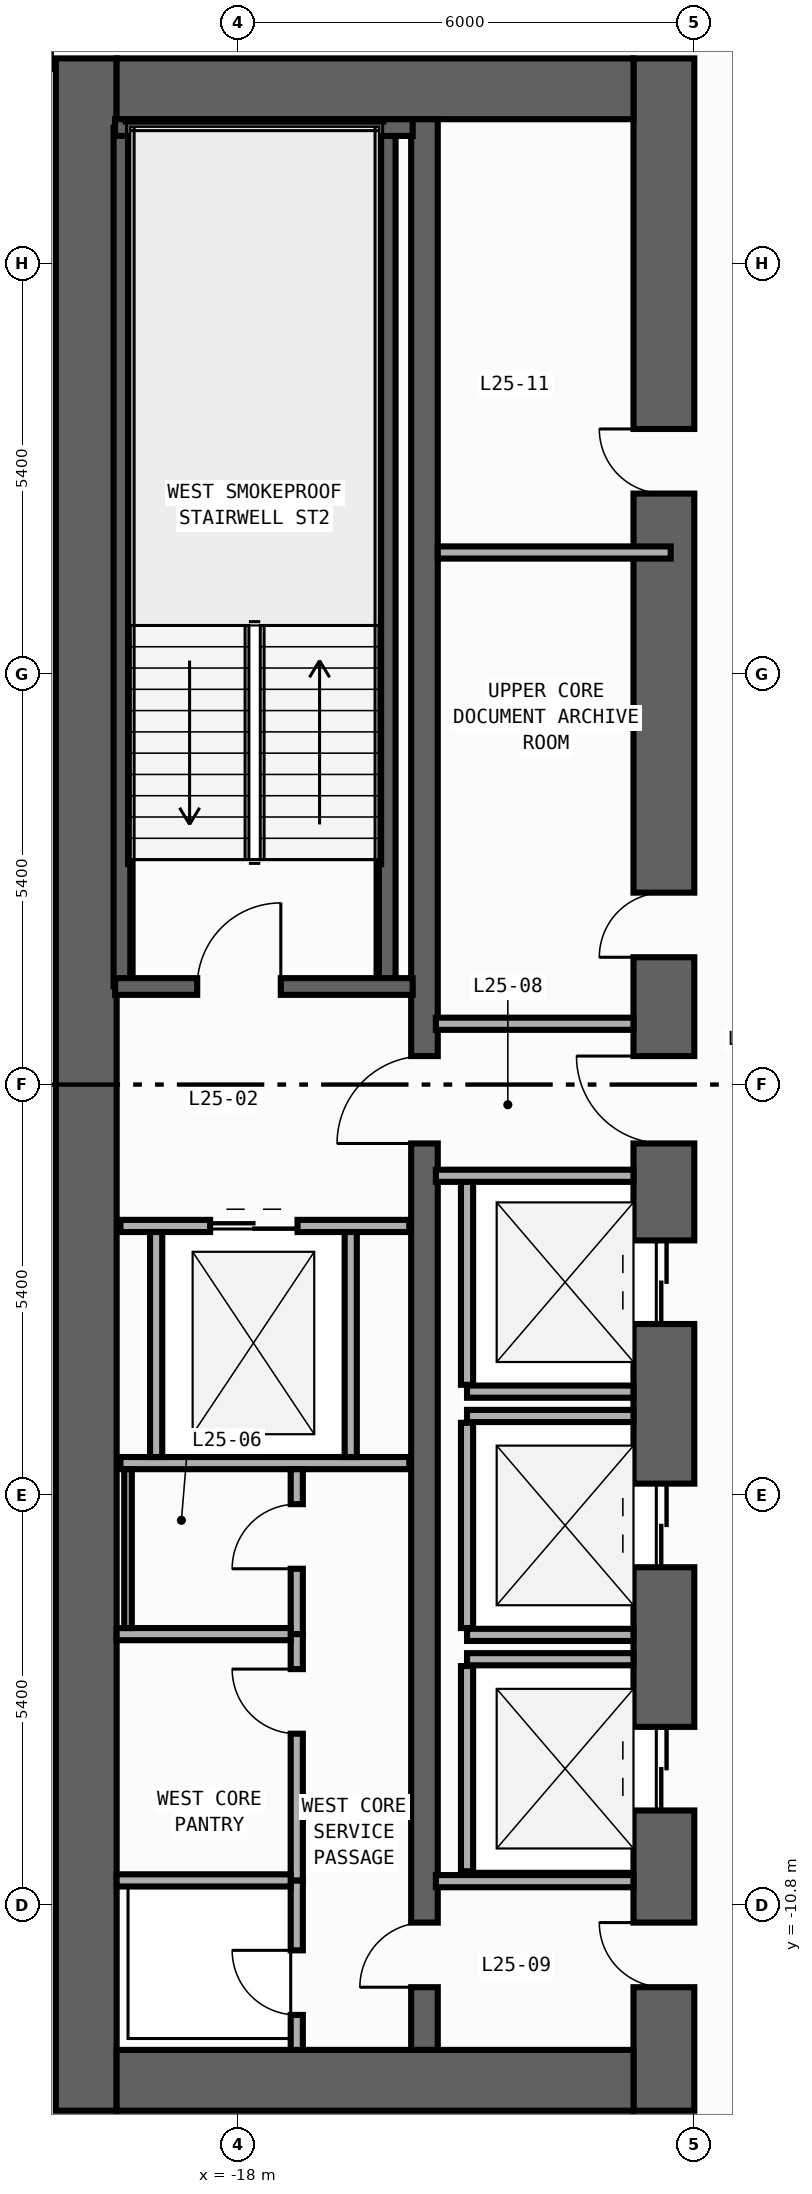
"""IFC4 building model, lengths in metres.
Left out: names, types, materials, properties, quantities, classifications, styles, units other than length and angle.
Written with IfcOpenShell. Run it as: python <this file> out.ifc"""

import sys

from ifc_helpers import new_model, si_unit, direction, frame, frame_2d, origin, place, context, subcontext, project, spatial, rectangle, extrude, element, fill, save


model = new_model("IFC4")
c1 = context("Model", 3, precision=1e-05, world=origin(), true_north=direction((0.0, 1.0)))
c2 = subcontext(c1, "Body", "Model", "MODEL_VIEW")
j1 = project(units=[si_unit("LENGTHUNIT", "METRE"), si_unit("PLANEANGLEUNIT", "RADIAN")], contexts=[c1])
p1 = place(None, origin())
s1 = spatial("IfcSite", under=j1, at=p1, CompositionType="ELEMENT")
p2 = place(p1, origin())
s2 = spatial("IfcBuilding", under=s1, at=p2, CompositionType="ELEMENT")
p3 = place(p2, frame((0.0, 0.0, 110.0)))
s3 = spatial("IfcBuildingStorey", under=s2, at=p3, CompositionType="ELEMENT", Elevation=110.0)
p4 = place(p3, frame((-20.0, -13.5, 0.0), z_axis=(0.0, 0.0, 1.0), x_axis=(0.0, 1.0, 0.0)))
e1 = element("IfcWall", 1, at=p4, inside=s3, PredefinedType="SHEAR", context=c2, shape_type="SweptSolid", body=[
    extrude(rectangle(XDim=27.0, YDim=0.8, at=frame_2d((13.5, 0.0))), origin(), (0.0, 0.0, 1.0), 3.94),
])
p5 = place(p3, frame((-12.4, -13.5, 0.0), z_axis=(0.0, 0.0, 1.0), x_axis=(0.0, 1.0, 0.0)))
e2 = element("IfcWall", 2, at=p5, inside=s3, PredefinedType="SHEAR", context=c2, shape_type="SweptSolid", body=[
    extrude(rectangle(XDim=27.0, YDim=0.8, at=frame_2d((13.5, 0.0))), origin(), (0.0, 0.0, 1.0), 3.94),
])
p6 = place(p5, frame((10.35, 0.0, 0.0)))
e3 = element("IfcOpeningElement", 3, at=p6, cuts=e2, PredefinedType="OPENING", context=c2, shape_type="SweptSolid", body=[
    extrude(rectangle(XDim=1.1, YDim=2.2, at=frame_2d((0.55, 1.1))), frame((0.0, 0.41, 0.0), z_axis=(0.0, -1.0, 0.0), x_axis=(1.0, 0.0, 0.0)), (0.0, 0.0, 1.0), 0.82),
])
p7 = place(p5, frame((7.15, 0.0, 0.0)))
e4 = element("IfcOpeningElement", 4, at=p7, cuts=e2, PredefinedType="OPENING", context=c2, shape_type="SweptSolid", body=[
    extrude(rectangle(XDim=1.1, YDim=2.2, at=frame_2d((0.55, 1.1))), frame((0.0, 0.41, 0.0), z_axis=(0.0, -1.0, 0.0), x_axis=(1.0, 0.0, 0.0)), (0.0, 0.0, 1.0), 0.82),
])
p8 = place(p5, frame((3.95, 0.0, 0.0)))
e5 = element("IfcOpeningElement", 5, at=p8, cuts=e2, PredefinedType="OPENING", context=c2, shape_type="SweptSolid", body=[
    extrude(rectangle(XDim=1.1, YDim=2.2, at=frame_2d((0.55, 1.1))), frame((0.0, 0.41, 0.0), z_axis=(0.0, -1.0, 0.0), x_axis=(1.0, 0.0, 0.0)), (0.0, 0.0, 1.0), 0.82),
])
p9 = place(p5, frame((15.175, 0.0, 0.0)))
e6 = element("IfcOpeningElement", 6, at=p9, cuts=e2, PredefinedType="OPENING", context=c2, shape_type="SweptSolid", body=[
    extrude(rectangle(XDim=0.85, YDim=2.1, at=frame_2d((0.425, 1.05))), frame((0.0, 0.41, 0.0), z_axis=(0.0, -1.0, 0.0), x_axis=(1.0, 0.0, 0.0)), (0.0, 0.0, 1.0), 0.82),
])
p10 = place(p5, frame((21.275, 0.0, 0.0)))
e7 = element("IfcOpeningElement", 7, at=p10, cuts=e2, PredefinedType="OPENING", context=c2, shape_type="SweptSolid", body=[
    extrude(rectangle(XDim=0.85, YDim=2.1, at=frame_2d((0.425, 1.05))), frame((0.0, 0.41, 0.0), z_axis=(0.0, -1.0, 0.0), x_axis=(1.0, 0.0, 0.0)), (0.0, 0.0, 1.0), 0.82),
])
p11 = place(p5, frame((12.725, 0.0, 0.0)))
e8 = element("IfcOpeningElement", 8, at=p11, cuts=e2, PredefinedType="OPENING", context=c2, shape_type="SweptSolid", body=[
    extrude(rectangle(XDim=1.15, YDim=2.2, at=frame_2d((0.575, 1.1))), frame((0.0, 0.41, 0.0), z_axis=(0.0, -1.0, 0.0), x_axis=(1.0, 0.0, 0.0)), (0.0, 0.0, 1.0), 0.82),
])
p12 = place(p5, frame((1.625, 0.0, 0.0)))
e9 = element("IfcOpeningElement", 9, at=p12, cuts=e2, PredefinedType="OPENING", context=c2, shape_type="SweptSolid", body=[
    extrude(rectangle(XDim=0.85, YDim=2.1, at=frame_2d((0.425, 1.05))), frame((0.0, 0.41, 0.0), z_axis=(0.0, -1.0, 0.0), x_axis=(1.0, 0.0, 0.0)), (0.0, 0.0, 1.0), 0.82),
])
for number, where, z_axis, x_axis in (
    (10, (-19.6, -13.1, 0.0), (0.0, 0.0, 1.0), (1.0, 0.0, 0.0)),
    (11, (-19.6, 13.1, 0.0), (0.0, 0.0, 1.0), (1.0, 0.0, 0.0)),
):
    element("IfcWall", number, at=place(p3, frame(where, z_axis=z_axis, x_axis=x_axis)), inside=s3, PredefinedType="SHEAR", context=c2, shape_type="SweptSolid", body=[
        extrude(rectangle(XDim=6.8, YDim=0.8, at=frame_2d((3.4, 0.0))), origin(), (0.0, 0.0, 1.0), 3.94),
    ])
p13 = place(p3, frame((-15.55, -12.7, 0.0), z_axis=(0.0, 0.0, 1.0), x_axis=(0.0, 1.0, 0.0)))
e12 = element("IfcWall", 12, at=p13, inside=s3, PredefinedType="SHEAR", context=c2, shape_type="SweptSolid", body=[
    extrude(rectangle(XDim=25.4, YDim=0.35, at=frame_2d((12.7, 0.0))), origin(), (0.0, 0.0, 1.0), 3.94),
])
p14 = place(p13, frame((11.925, 0.0, 0.0)))
e13 = element("IfcOpeningElement", 13, at=p14, cuts=e12, PredefinedType="OPENING", context=c2, shape_type="SweptSolid", body=[
    extrude(rectangle(XDim=1.15, YDim=2.2, at=frame_2d((0.575, 1.1))), frame((0.0, 0.185, 0.0), z_axis=(0.0, -1.0, 0.0), x_axis=(1.0, 0.0, 0.0)), (0.0, 0.0, 1.0), 0.37),
])
p15 = place(p13, frame((0.825, 0.0, 0.0)))
e14 = element("IfcOpeningElement", 14, at=p15, cuts=e12, PredefinedType="OPENING", context=c2, shape_type="SweptSolid", body=[
    extrude(rectangle(XDim=0.85, YDim=2.1, at=frame_2d((0.425, 1.05))), frame((0.0, 0.185, 0.0), z_axis=(0.0, -1.0, 0.0), x_axis=(1.0, 0.0, 0.0)), (0.0, 0.0, 1.0), 0.37),
])
for number, where, z_axis, x_axis in (
    (15, (-16.04, 1.29, 0.0), (0.0, 0.0, 1.0), (0.0, 1.0, 0.0)),
    (16, (-19.53, 1.29, 0.0), (0.0, 0.0, 1.0), (0.0, 1.0, 0.0)),
):
    element("IfcWall", number, at=place(p3, frame(where, z_axis=z_axis, x_axis=x_axis)), inside=s3, PredefinedType="SHEAR", context=c2, shape_type="SweptSolid", body=[
        extrude(rectangle(XDim=11.3, YDim=0.22, at=frame_2d((5.65, 0.0))), origin(), (0.0, 0.0, 1.0), 3.94),
    ])
p16 = place(p3, frame((-19.62, 12.59, 0.0), z_axis=(0.0, 0.0, 1.0), x_axis=(1.0, 0.0, 0.0)))
e17 = element("IfcWall", 17, at=p16, inside=s3, PredefinedType="SHEAR", context=c2, shape_type="SweptSolid", body=[
    extrude(rectangle(XDim=3.915, YDim=0.22, at=frame_2d((1.958, 0.0))), origin(), (0.0, 0.0, 1.0), 3.94),
])
p17 = place(p3, frame((-19.62, 1.29, 0.0), z_axis=(0.0, 0.0, 1.0), x_axis=(1.0, 0.0, 0.0)))
e18 = element("IfcWall", 18, at=p17, inside=s3, PredefinedType="SHEAR", context=c2, shape_type="SweptSolid", body=[
    extrude(rectangle(XDim=3.915, YDim=0.22, at=frame_2d((1.958, 0.0))), origin(), (0.0, 0.0, 1.0), 3.94),
])
p18 = place(p17, frame((1.08, 0.0, 0.0)))
e19 = element("IfcOpeningElement", 19, at=p18, cuts=e18, PredefinedType="OPENING", context=c2, shape_type="SweptSolid", body=[
    extrude(rectangle(XDim=1.1, YDim=2.2, at=frame_2d((0.55, 1.1))), frame((0.0, 0.12, 0.0), z_axis=(0.0, -1.0, 0.0), x_axis=(1.0, 0.0, 0.0)), (0.0, 0.0, 1.0), 0.24),
])
p19 = place(p3, frame((-14.99, -4.04, 0.0), z_axis=(0.0, 0.0, 1.0), x_axis=(1.0, 0.0, 0.0)))
e20 = element("IfcWall", 20, at=p19, inside=s3, PredefinedType="STANDARD", context=c2, shape_type="SweptSolid", body=[
    extrude(rectangle(XDim=2.19, YDim=0.16, at=frame_2d((1.095, 0.0))), origin(), (0.0, 0.0, 1.0), 3.94),
])
p20 = place(p3, frame((-14.99, -3.95, 0.0), z_axis=(0.0, 0.0, 1.0), x_axis=(0.0, 1.0, 0.0)))
e21 = element("IfcWall", 21, at=p20, inside=s3, PredefinedType="STANDARD", context=c2, shape_type="SweptSolid", body=[
    extrude(rectangle(XDim=2.7, YDim=0.16, at=frame_2d((1.35, 0.0))), origin(), (0.0, 0.0, 1.0), 3.94),
])
for number, where, z_axis, x_axis in (
    (22, (-14.99, -7.24, 0.0), (0.0, 0.0, 1.0), (1.0, 0.0, 0.0)),
    (23, (-14.99, -4.36, 0.0), (0.0, 0.0, 1.0), (1.0, 0.0, 0.0)),
):
    element("IfcWall", number, at=place(p3, frame(where, z_axis=z_axis, x_axis=x_axis)), inside=s3, PredefinedType="STANDARD", context=c2, shape_type="SweptSolid", body=[
        extrude(rectangle(XDim=2.19, YDim=0.16, at=frame_2d((1.095, 0.0))), origin(), (0.0, 0.0, 1.0), 3.94),
    ])
p21 = place(p3, frame((-14.99, -7.15, 0.0), z_axis=(0.0, 0.0, 1.0), x_axis=(0.0, 1.0, 0.0)))
e24 = element("IfcWall", 24, at=p21, inside=s3, PredefinedType="STANDARD", context=c2, shape_type="SweptSolid", body=[
    extrude(rectangle(XDim=2.7, YDim=0.16, at=frame_2d((1.35, 0.0))), origin(), (0.0, 0.0, 1.0), 3.94),
])
p22 = place(p3, frame((-14.99, -7.56, 0.0), z_axis=(0.0, 0.0, 1.0), x_axis=(1.0, 0.0, 0.0)))
e25 = element("IfcWall", 25, at=p22, inside=s3, PredefinedType="STANDARD", context=c2, shape_type="SweptSolid", body=[
    extrude(rectangle(XDim=2.19, YDim=0.16, at=frame_2d((1.095, 0.0))), origin(), (0.0, 0.0, 1.0), 3.94),
])
p23 = place(p3, frame((-14.99, -10.35, 0.0), z_axis=(0.0, 0.0, 1.0), x_axis=(0.0, 1.0, 0.0)))
e26 = element("IfcWall", 26, at=p23, inside=s3, PredefinedType="STANDARD", context=c2, shape_type="SweptSolid", body=[
    extrude(rectangle(XDim=2.7, YDim=0.16, at=frame_2d((1.35, 0.0))), origin(), (0.0, 0.0, 1.0), 3.94),
])
p24 = place(p3, frame((-19.55, -1.86, 0.0), z_axis=(0.0, 0.0, 1.0), x_axis=(1.0, 0.0, 0.0)))
e27 = element("IfcWall", 27, at=p24, inside=s3, PredefinedType="STANDARD", context=c2, shape_type="SweptSolid", body=[
    extrude(rectangle(XDim=3.8, YDim=0.16, at=frame_2d((1.9, 0.0))), origin(), (0.0, 0.0, 1.0), 3.94),
])
p25 = place(p24, frame((1.18, 0.0, 0.0)))
e28 = element("IfcOpeningElement", 28, at=p25, cuts=e27, PredefinedType="OPENING", context=c2, shape_type="SweptSolid", body=[
    extrude(rectangle(XDim=1.15, YDim=2.2, at=frame_2d((0.575, 1.1))), frame((0.0, 0.09, 0.0), z_axis=(0.0, -1.0, 0.0), x_axis=(1.0, 0.0, 0.0)), (0.0, 0.0, 1.0), 0.18),
])
p26 = place(p3, frame((-19.55, -4.98, 0.0), z_axis=(0.0, 0.0, 1.0), x_axis=(1.0, 0.0, 0.0)))
e29 = element("IfcWall", 29, at=p26, inside=s3, PredefinedType="STANDARD", context=c2, shape_type="SweptSolid", body=[
    extrude(rectangle(XDim=3.8, YDim=0.16, at=frame_2d((1.9, 0.0))), origin(), (0.0, 0.0, 1.0), 3.94),
])
for number, where, z_axis, x_axis in (
    (30, (-19.08, -4.9, 0.0), (0.0, 0.0, 1.0), (0.0, 1.0, 0.0)),
    (31, (-16.52, -4.9, 0.0), (0.0, 0.0, 1.0), (0.0, 1.0, 0.0)),
):
    element("IfcWall", number, at=place(p3, frame(where, z_axis=z_axis, x_axis=x_axis)), inside=s3, PredefinedType="STANDARD", context=c2, shape_type="SweptSolid", body=[
        extrude(rectangle(XDim=2.96, YDim=0.16, at=frame_2d((1.48, 0.0))), origin(), (0.0, 0.0, 1.0), 3.94),
    ])
for number, where, z_axis, x_axis in (
    (32, (-15.4, 0.8, 0.0), (0.0, 0.0, 1.0), (1.0, 0.0, 0.0)),
    (33, (-15.4, -1.2, 0.0), (0.0, 0.0, 1.0), (1.0, 0.0, 0.0)),
    (34, (-15.4, -10.48, 0.0), (0.0, 0.0, 1.0), (1.0, 0.0, 0.0)),
):
    element("IfcWall", number, at=place(p3, frame(where, z_axis=z_axis, x_axis=x_axis)), inside=s3, PredefinedType="STANDARD", context=c2, shape_type="SweptSolid", body=[
        extrude(rectangle(XDim=2.6, YDim=0.16, at=frame_2d((1.3, 0.0))), origin(), (0.0, 0.0, 1.0), 3.94),
    ])
p27 = place(p3, frame((-17.23, -12.7, 0.0), z_axis=(0.0, 0.0, 1.0), x_axis=(0.0, 1.0, 0.0)))
e35 = element("IfcWall", 35, at=p27, inside=s3, PredefinedType="PARTITIONING", context=c2, shape_type="SweptSolid", body=[
    extrude(rectangle(XDim=2.23, YDim=0.16, at=frame_2d((1.115, 0.0))), origin(), (0.0, 0.0, 1.0), 3.94),
])
p28 = place(p27, frame((0.46, 0.0, 0.0)))
e36 = element("IfcOpeningElement", 36, at=p28, cuts=e35, PredefinedType="OPENING", context=c2, shape_type="SweptSolid", body=[
    extrude(rectangle(XDim=0.85, YDim=2.1, at=frame_2d((0.425, 1.05))), frame((0.0, 0.09, 0.0), z_axis=(0.0, -1.0, 0.0), x_axis=(1.0, 0.0, 0.0)), (0.0, 0.0, 1.0), 0.18),
])
p29 = place(p3, frame((-17.23, -7.23, 0.0), z_axis=(0.0, 0.0, 1.0), x_axis=(0.0, 1.0, 0.0)))
e37 = element("IfcWall", 37, at=p29, inside=s3, PredefinedType="PARTITIONING", context=c2, shape_type="SweptSolid", body=[
    extrude(rectangle(XDim=2.17, YDim=0.16, at=frame_2d((1.085, 0.0))), origin(), (0.0, 0.0, 1.0), 3.94),
])
p30 = place(p29, frame((0.86, 0.0, 0.0)))
e38 = element("IfcOpeningElement", 38, at=p30, cuts=e37, PredefinedType="OPENING", context=c2, shape_type="SweptSolid", body=[
    extrude(rectangle(XDim=0.85, YDim=2.1, at=frame_2d((0.425, 1.05))), frame((0.0, 0.09, 0.0), z_axis=(0.0, -1.0, 0.0), x_axis=(1.0, 0.0, 0.0)), (0.0, 0.0, 1.0), 0.18),
])
p31 = place(p3, frame((-17.23, -10.47, 0.0), z_axis=(0.0, 0.0, 1.0), x_axis=(0.0, 1.0, 0.0)))
e39 = element("IfcWall", 39, at=p31, inside=s3, PredefinedType="PARTITIONING", context=c2, shape_type="SweptSolid", body=[
    extrude(rectangle(XDim=3.24, YDim=0.16, at=frame_2d((1.62, 0.0))), origin(), (0.0, 0.0, 1.0), 3.94),
])
p32 = place(p31, frame((1.93, 0.0, 0.0)))
e40 = element("IfcOpeningElement", 40, at=p32, cuts=e39, PredefinedType="OPENING", context=c2, shape_type="SweptSolid", body=[
    extrude(rectangle(XDim=0.85, YDim=2.1, at=frame_2d((0.425, 1.05))), frame((0.0, 0.09, 0.0), z_axis=(0.0, -1.0, 0.0), x_axis=(1.0, 0.0, 0.0)), (0.0, 0.0, 1.0), 0.18),
])
for number, where, z_axis, x_axis in (
    (41, (-19.6, -10.47, 0.0), (0.0, 0.0, 1.0), (1.0, 0.0, 0.0)),
    (42, (-19.6, -7.23, 0.0), (0.0, 0.0, 1.0), (1.0, 0.0, 0.0)),
):
    element("IfcWall", number, at=place(p3, frame(where, z_axis=z_axis, x_axis=x_axis)), inside=s3, PredefinedType="PARTITIONING", context=c2, shape_type="SweptSolid", body=[
        extrude(rectangle(XDim=2.29, YDim=0.16, at=frame_2d((1.145, 0.0))), origin(), (0.0, 0.0, 1.0), 3.94),
    ])
p33 = place(p3, frame((-15.375, 7.0, 0.0), z_axis=(0.0, 0.0, 1.0), x_axis=(1.0, 0.0, 0.0)))
e43 = element("IfcWall", 43, at=p33, inside=s3, PredefinedType="PARTITIONING", context=c2, shape_type="SweptSolid", body=[
    extrude(rectangle(XDim=3.065, YDim=0.16, at=frame_2d((1.532, 0.0))), origin(), (0.0, 0.0, 1.0), 3.94),
])
p34 = place(p3, frame((-19.45, -7.15, 0.0), z_axis=(0.0, 0.0, 1.0), x_axis=(0.0, 1.0, 0.0)))
e44 = element("IfcWall", 44, at=p34, inside=s3, PredefinedType="PARTITIONING", context=c2, shape_type="SweptSolid", body=[
    extrude(rectangle(XDim=2.09, YDim=0.1, at=frame_2d((1.045, 0.0))), origin(), (0.0, 0.0, 1.0), 3.94),
])
p35 = place(p18, origin())
e45 = element("IfcDoor", 45, at=p35, inside=s3, OperationType="SINGLE_SWING_RIGHT", PredefinedType="DOOR", context=c2, shape_type="SweptSolid", body=[
    extrude(rectangle(XDim=1.1, YDim=2.2, at=frame_2d((0.55, 1.1))), frame((0.0, 0.025, 0.0), z_axis=(0.0, -1.0, 0.0), x_axis=(1.0, 0.0, 0.0)), (0.0, 0.0, 1.0), 0.05),
])
fill(e19, e45)
p36 = place(p6, origin())
e46 = element("IfcDoor", 46, at=p36, inside=s3, OperationType="DOUBLE_DOOR_SLIDING", PredefinedType="DOOR", context=c2, shape_type="SweptSolid", body=[
    extrude(rectangle(XDim=1.1, YDim=2.2, at=frame_2d((0.55, 1.1))), frame((0.0, 0.025, 0.0), z_axis=(0.0, -1.0, 0.0), x_axis=(1.0, 0.0, 0.0)), (0.0, 0.0, 1.0), 0.05),
])
fill(e3, e46)
p37 = place(p7, origin())
e47 = element("IfcDoor", 47, at=p37, inside=s3, OperationType="DOUBLE_DOOR_SLIDING", PredefinedType="DOOR", context=c2, shape_type="SweptSolid", body=[
    extrude(rectangle(XDim=1.1, YDim=2.2, at=frame_2d((0.55, 1.1))), frame((0.0, 0.025, 0.0), z_axis=(0.0, -1.0, 0.0), x_axis=(1.0, 0.0, 0.0)), (0.0, 0.0, 1.0), 0.05),
])
fill(e4, e47)
p38 = place(p8, origin())
e48 = element("IfcDoor", 48, at=p38, inside=s3, OperationType="DOUBLE_DOOR_SLIDING", PredefinedType="DOOR", context=c2, shape_type="SweptSolid", body=[
    extrude(rectangle(XDim=1.1, YDim=2.2, at=frame_2d((0.55, 1.1))), frame((0.0, 0.025, 0.0), z_axis=(0.0, -1.0, 0.0), x_axis=(1.0, 0.0, 0.0)), (0.0, 0.0, 1.0), 0.05),
])
fill(e5, e48)
p39 = place(p9, origin())
e49 = element("IfcDoor", 49, at=p39, inside=s3, OperationType="SINGLE_SWING_LEFT", PredefinedType="DOOR", context=c2, shape_type="SweptSolid", body=[
    extrude(rectangle(XDim=0.85, YDim=2.1, at=frame_2d((0.425, 1.05))), frame((0.0, 0.025, 0.0), z_axis=(0.0, -1.0, 0.0), x_axis=(1.0, 0.0, 0.0)), (0.0, 0.0, 1.0), 0.05),
])
fill(e6, e49)
p40 = place(p10, origin())
e50 = element("IfcDoor", 50, at=p40, inside=s3, OperationType="SINGLE_SWING_RIGHT", PredefinedType="DOOR", context=c2, shape_type="SweptSolid", body=[
    extrude(rectangle(XDim=0.85, YDim=2.1, at=frame_2d((0.425, 1.05))), frame((0.0, 0.025, 0.0), z_axis=(0.0, -1.0, 0.0), x_axis=(1.0, 0.0, 0.0)), (0.0, 0.0, 1.0), 0.05),
])
fill(e7, e50)
p41 = place(p11, origin())
e51 = element("IfcDoor", 51, at=p41, inside=s3, OperationType="SINGLE_SWING_RIGHT", PredefinedType="DOOR", context=c2, shape_type="SweptSolid", body=[
    extrude(rectangle(XDim=1.15, YDim=2.2, at=frame_2d((0.575, 1.1))), frame((0.0, 0.025, 0.0), z_axis=(0.0, -1.0, 0.0), x_axis=(1.0, 0.0, 0.0)), (0.0, 0.0, 1.0), 0.05),
])
fill(e8, e51)
p42 = place(p14, origin())
e52 = element("IfcDoor", 52, at=p42, inside=s3, OperationType="SINGLE_SWING_LEFT", PredefinedType="DOOR", context=c2, shape_type="SweptSolid", body=[
    extrude(rectangle(XDim=1.15, YDim=2.2, at=frame_2d((0.575, 1.1))), frame((0.0, 0.025, 0.0), z_axis=(0.0, -1.0, 0.0), x_axis=(1.0, 0.0, 0.0)), (0.0, 0.0, 1.0), 0.05),
])
fill(e13, e52)
p43 = place(p12, origin())
e53 = element("IfcDoor", 53, at=p43, inside=s3, OperationType="SINGLE_SWING_RIGHT", PredefinedType="DOOR", context=c2, shape_type="SweptSolid", body=[
    extrude(rectangle(XDim=0.85, YDim=2.1, at=frame_2d((0.425, 1.05))), frame((0.0, 0.025, 0.0), z_axis=(0.0, -1.0, 0.0), x_axis=(1.0, 0.0, 0.0)), (0.0, 0.0, 1.0), 0.05),
])
fill(e9, e53)
p44 = place(p15, origin())
e54 = element("IfcDoor", 54, at=p44, inside=s3, OperationType="SINGLE_SWING_LEFT", PredefinedType="DOOR", context=c2, shape_type="SweptSolid", body=[
    extrude(rectangle(XDim=0.85, YDim=2.1, at=frame_2d((0.425, 1.05))), frame((0.0, 0.025, 0.0), z_axis=(0.0, -1.0, 0.0), x_axis=(1.0, 0.0, 0.0)), (0.0, 0.0, 1.0), 0.05),
])
fill(e14, e54)
p45 = place(p25, origin())
e55 = element("IfcDoor", 55, at=p45, inside=s3, OperationType="DOUBLE_DOOR_SLIDING", PredefinedType="DOOR", context=c2, shape_type="SweptSolid", body=[
    extrude(rectangle(XDim=1.15, YDim=2.2, at=frame_2d((0.575, 1.1))), frame((0.0, 0.025, 0.0), z_axis=(0.0, -1.0, 0.0), x_axis=(1.0, 0.0, 0.0)), (0.0, 0.0, 1.0), 0.05),
])
fill(e28, e55)
p46 = place(p28, origin())
e56 = element("IfcDoor", 56, at=p46, inside=s3, OperationType="SINGLE_SWING_RIGHT", PredefinedType="DOOR", context=c2, shape_type="SweptSolid", body=[
    extrude(rectangle(XDim=0.85, YDim=2.1, at=frame_2d((0.425, 1.05))), frame((0.0, 0.025, 0.0), z_axis=(0.0, -1.0, 0.0), x_axis=(1.0, 0.0, 0.0)), (0.0, 0.0, 1.0), 0.05),
])
fill(e36, e56)
p47 = place(p30, origin())
e57 = element("IfcDoor", 57, at=p47, inside=s3, OperationType="SINGLE_SWING_LEFT", PredefinedType="DOOR", context=c2, shape_type="SweptSolid", body=[
    extrude(rectangle(XDim=0.85, YDim=2.1, at=frame_2d((0.425, 1.05))), frame((0.0, 0.025, 0.0), z_axis=(0.0, -1.0, 0.0), x_axis=(1.0, 0.0, 0.0)), (0.0, 0.0, 1.0), 0.05),
])
fill(e38, e57)
p48 = place(p32, origin())
e58 = element("IfcDoor", 58, at=p48, inside=s3, OperationType="SINGLE_SWING_RIGHT", PredefinedType="DOOR", context=c2, shape_type="SweptSolid", body=[
    extrude(rectangle(XDim=0.85, YDim=2.1, at=frame_2d((0.425, 1.05))), frame((0.0, 0.025, 0.0), z_axis=(0.0, -1.0, 0.0), x_axis=(1.0, 0.0, 0.0)), (0.0, 0.0, 1.0), 0.05),
])
fill(e40, e58)
save(model, sys.argv[1])
